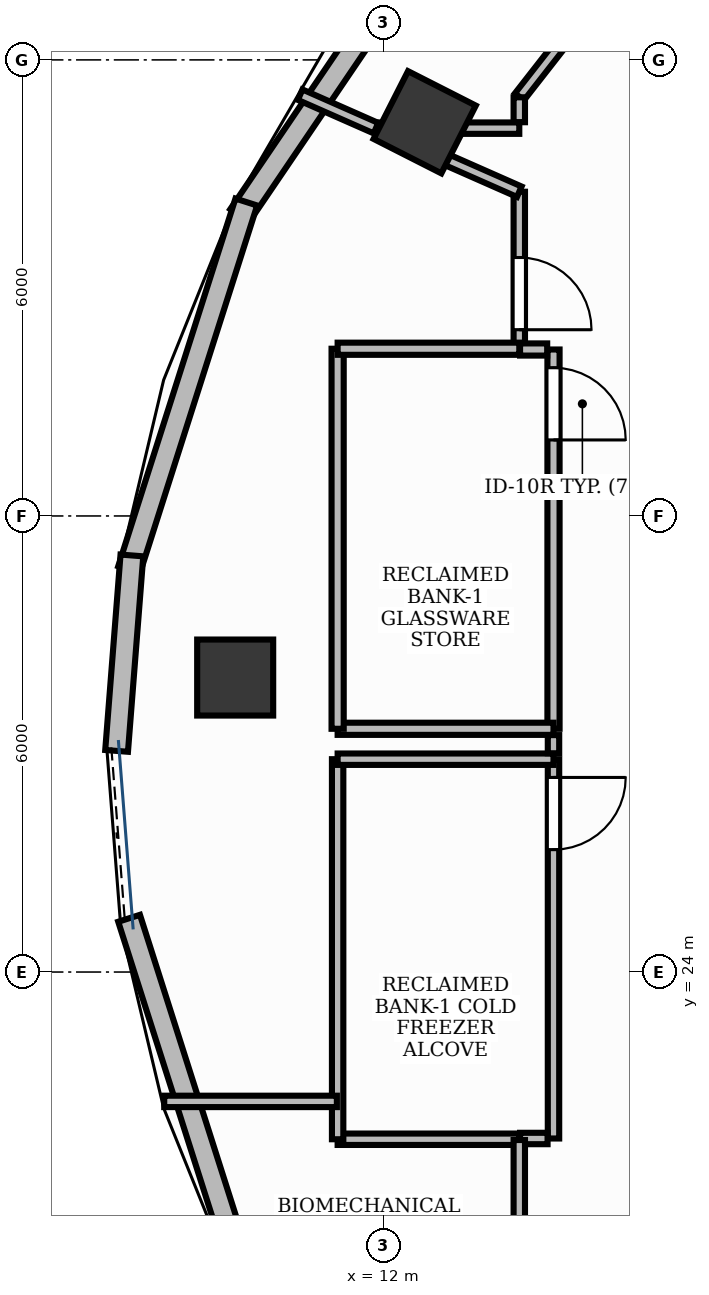
"""IFC4 building model, lengths in metres.
Left out: names, types, materials, properties, quantities, classifications, styles, units other than length and angle.
Written with IfcOpenShell. Run it as: python <this file> out.ifc"""

import sys

from ifc_helpers import new_model, si_unit, direction, frame, frame_2d, origin, origin_2d, place, context, subcontext, project, spatial, rectangle, extrude, element, fill, save


model = new_model("IFC4")
c1 = context("Model", 3, precision=1e-05, world=origin(), true_north=direction((0.0, 1.0)))
c2 = subcontext(c1, "Body", "Model", "MODEL_VIEW")
j1 = project(units=[si_unit("LENGTHUNIT", "METRE"), si_unit("PLANEANGLEUNIT", "RADIAN")], contexts=[c1])
p1 = place(None, origin())
s1 = spatial("IfcSite", under=j1, at=p1, CompositionType="ELEMENT")
p2 = place(p1, origin())
s2 = spatial("IfcBuilding", under=s1, at=p2, CompositionType="ELEMENT")
p3 = place(p2, frame((0.0, 0.0, 200.4)))
s3 = spatial("IfcBuildingStorey", under=s2, at=p3, CompositionType="ELEMENT", Elevation=200.4)
for number, where, z_axis, x_axis in (
    (1, (12.545, 35.18, -0.0), (0.0, 0.0, 1.0), (0.453, 0.891, 0.0)),
    (2, (10.052, 27.874, -0.0), (0.0, 0.0, 1.0), (0.0, 1.0, 0.0)),
):
    element("IfcColumn", number, at=place(p3, frame(where, z_axis=z_axis, x_axis=x_axis)), inside=s3, PredefinedType="COLUMN", context=c2, shape_type="SweptSolid", body=[
        extrude(rectangle(XDim=1.0, YDim=1.0, at=origin_2d()), origin(), (0.0, 0.0, 1.0), 3.901),
    ])
p4 = place(p3, frame((13.103, 38.36, 0.0), z_axis=(0.0, 0.0, 1.0), x_axis=(-0.561387104339, -0.827553333074, 0.0)))
e3 = element("IfcWall", 3, at=p4, inside=s3, PredefinedType="STANDARD", context=c2, shape_type="SweptSolid", body=[
    extrude(rectangle(XDim=5.327, YDim=0.3, at=frame_2d((2.664, 0.0))), origin(), (0.0, 0.0, 1.0), 3.47),
])
p5 = place(p3, frame((10.198, 34.13, 0.0), z_axis=(0.0, 0.0, 1.0), x_axis=(-0.30372166002, -0.952760805887, 0.0)))
e4 = element("IfcWall", 4, at=p5, inside=s3, PredefinedType="STANDARD", context=c2, shape_type="SweptSolid", body=[
    extrude(rectangle(XDim=5.077, YDim=0.3, at=frame_2d((2.539, 0.0))), origin(), (0.0, 0.0, 1.0), 3.47),
])
p6 = place(p3, frame((8.693, 29.48, 0.0), z_axis=(0.0, 0.0, 1.0), x_axis=(-0.077999392987, -0.996953406481, 0.0)))
e5 = element("IfcWall", 5, at=p6, inside=s3, PredefinedType="STANDARD", context=c2, shape_type="SweptSolid", body=[
    extrude(rectangle(XDim=2.579, YDim=0.3, at=frame_2d((1.29, 0.0))), origin(), (0.0, 0.0, 1.0), 3.47),
])
p7 = place(p3, frame((8.656, 24.707, 0.0), z_axis=(0.0, 0.0, 1.0), x_axis=(0.30372166002, -0.952760805887, 0.0)))
e6 = element("IfcWall", 6, at=p7, inside=s3, PredefinedType="STANDARD", context=c2, shape_type="SweptSolid", body=[
    extrude(rectangle(XDim=5.077, YDim=0.3, at=frame_2d((2.539, 0.0))), origin(), (0.0, 0.0, 1.0), 3.9),
])
p8 = place(p3, frame((14.24, 26.8, 0.0), z_axis=(0.0, 0.0, 1.0), x_axis=(0.0, -1.0, 0.0)))
e7 = element("IfcWall", 7, at=p8, inside=s3, PredefinedType="PARTITIONING", context=c2, shape_type="SweptSolid", body=[
    extrude(rectangle(XDim=4.99, YDim=0.15, at=frame_2d((2.495, 0.0))), origin(), (0.0, 0.0, 1.0), 2.91),
])
p9 = place(p8, frame((0.24, 0.0, 0.0)))
e8 = element("IfcOpeningElement", 8, at=p9, cuts=e7, PredefinedType="OPENING", context=c2, shape_type="SweptSolid", body=[
    extrude(rectangle(XDim=0.95, YDim=2.15, at=frame_2d((0.475, 1.075))), frame((0.0, 0.09, 0.0), z_axis=(0.0, -1.0, 0.0), x_axis=(1.0, 0.0, 0.0)), (0.0, 0.0, 1.0), 0.18),
])
p10 = place(p3, frame((14.24, 32.19, 0.0), z_axis=(0.0, 0.0, 1.0), x_axis=(0.0, -1.0, 0.0)))
e9 = element("IfcWall", 9, at=p10, inside=s3, PredefinedType="PARTITIONING", context=c2, shape_type="SweptSolid", body=[
    extrude(rectangle(XDim=4.99, YDim=0.16, at=frame_2d((2.495, 0.0))), origin(), (0.0, 0.0, 1.0), 2.91),
])
p11 = place(p10, frame((0.24, 0.0, 0.0)))
e10 = element("IfcOpeningElement", 10, at=p11, cuts=e9, PredefinedType="OPENING", context=c2, shape_type="SweptSolid", body=[
    extrude(rectangle(XDim=0.95, YDim=2.15, at=frame_2d((0.475, 1.075))), frame((0.0, 0.095, 0.0), z_axis=(0.0, -1.0, 0.0), x_axis=(1.0, 0.0, 0.0)), (0.0, 0.0, 1.0), 0.19),
])
p12 = place(p3, frame((13.79, 34.266, 0.0), z_axis=(0.0, 0.0, 1.0), x_axis=(0.0, -1.0, 0.0)))
e11 = element("IfcWall", 11, at=p12, inside=s3, PredefinedType="PARTITIONING", context=c2, shape_type="SweptSolid", body=[
    extrude(rectangle(XDim=2.056, YDim=0.15, at=frame_2d((1.028, 0.0))), origin(), (0.0, 0.0, 1.0), 2.91),
])
p13 = place(p12, frame((0.865, 0.0, 0.0)))
e12 = element("IfcOpeningElement", 12, at=p13, cuts=e11, PredefinedType="OPENING", context=c2, shape_type="SweptSolid", body=[
    extrude(rectangle(XDim=0.95, YDim=2.15, at=frame_2d((0.475, 1.075))), frame((0.0, 0.09, 0.0), z_axis=(0.0, -1.0, 0.0), x_axis=(1.0, 0.0, 0.0)), (0.0, 0.0, 1.0), 0.18),
])
p14 = place(p3, frame((14.162, 21.81, 0.0), z_axis=(0.0, 0.0, 1.0), x_axis=(-1.0, 0.0, 0.0)))
e13 = element("IfcWall", 13, at=p14, inside=s3, PredefinedType="PARTITIONING", context=c2, shape_type="SweptSolid", body=[
    extrude(rectangle(XDim=0.362, YDim=0.15, at=frame_2d((0.181, 0.0))), origin(), (0.0, 0.0, 1.0), 2.91),
])
p15 = place(p3, frame((13.79, 21.8, 0.0), z_axis=(0.0, 0.0, 1.0), x_axis=(-1.0, 0.0, 0.0)))
e14 = element("IfcWall", 14, at=p15, inside=s3, PredefinedType="PARTITIONING", context=c2, shape_type="SweptSolid", body=[
    extrude(rectangle(XDim=2.39, YDim=0.15, at=frame_2d((1.195, 0.0))), origin(), (0.0, 0.0, 1.0), 2.91),
])
p16 = place(p3, frame((11.4, 21.8, 0.0), z_axis=(0.0, 0.0, 1.0), x_axis=(0.0, 1.0, 0.0)))
e15 = element("IfcWall", 15, at=p16, inside=s3, PredefinedType="PARTITIONING", context=c2, shape_type="SweptSolid", body=[
    extrude(rectangle(XDim=5.0, YDim=0.15, at=frame_2d((2.5, 0.0))), origin(), (0.0, 0.0, 1.0), 2.91),
])
p17 = place(p3, frame((11.4, 26.8, 0.0), z_axis=(0.0, 0.0, 1.0), x_axis=(1.0, 0.0, 0.0)))
e16 = element("IfcWall", 16, at=p17, inside=s3, PredefinedType="PARTITIONING", context=c2, shape_type="SweptSolid", body=[
    extrude(rectangle(XDim=2.84, YDim=0.15, at=frame_2d((1.42, 0.0))), origin(), (0.0, 0.0, 1.0), 2.91),
])
p18 = place(p3, frame((13.8, 32.19, 0.0), z_axis=(0.0, 0.0, 1.0), x_axis=(1.0, 0.0, 0.0)))
e17 = element("IfcWall", 17, at=p18, inside=s3, PredefinedType="PARTITIONING", context=c2, shape_type="SweptSolid", body=[
    extrude(rectangle(XDim=0.357, YDim=0.16, at=frame_2d((0.178, 0.0))), origin(), (0.0, 0.0, 1.0), 2.91),
])
p19 = place(p3, frame((14.24, 27.2, 0.0), z_axis=(0.0, 0.0, 1.0), x_axis=(-1.0, 0.0, 0.0)))
e18 = element("IfcWall", 18, at=p19, inside=s3, PredefinedType="PARTITIONING", context=c2, shape_type="SweptSolid", body=[
    extrude(rectangle(XDim=2.84, YDim=0.16, at=frame_2d((1.42, 0.0))), origin(), (0.0, 0.0, 1.0), 2.91),
])
p20 = place(p3, frame((11.4, 27.2, 0.0), z_axis=(0.0, 0.0, 1.0), x_axis=(0.0, 1.0, 0.0)))
e19 = element("IfcWall", 19, at=p20, inside=s3, PredefinedType="PARTITIONING", context=c2, shape_type="SweptSolid", body=[
    extrude(rectangle(XDim=5.0, YDim=0.16, at=frame_2d((2.5, 0.0))), origin(), (0.0, 0.0, 1.0), 2.91),
])
p21 = place(p3, frame((11.4, 32.2, 0.0), z_axis=(0.0, 0.0, 1.0), x_axis=(1.0, 0.0, 0.0)))
e20 = element("IfcWall", 20, at=p21, inside=s3, PredefinedType="PARTITIONING", context=c2, shape_type="SweptSolid", body=[
    extrude(rectangle(XDim=2.39, YDim=0.16, at=frame_2d((1.195, 0.0))), origin(), (0.0, 0.0, 1.0), 2.91),
])
p22 = place(p3, frame((9.119, 22.298, 0.0), z_axis=(0.0, 0.0, 1.0), x_axis=(1.0, 0.0, 0.0)))
e21 = element("IfcWall", 21, at=p22, inside=s3, PredefinedType="PARTITIONING", context=c2, shape_type="SweptSolid", body=[
    extrude(rectangle(XDim=2.271, YDim=0.15, at=frame_2d((1.136, 0.0))), origin(), (0.0, 0.0, 1.0), 2.91),
])
p23 = place(p3, frame((13.79, 21.79, 0.0), z_axis=(0.0, 0.0, 1.0), x_axis=(0.0, -1.0, 0.0)))
e22 = element("IfcWall", 22, at=p23, inside=s3, PredefinedType="PARTITIONING", context=c2, shape_type="SweptSolid", body=[
    extrude(rectangle(XDim=3.298, YDim=0.15, at=frame_2d((1.649, 0.0))), origin(), (0.0, 0.0, 1.0), 2.91),
])
p24 = place(p3, frame((14.76, 36.754, 0.0), z_axis=(0.0, 0.0, 1.0), x_axis=(-0.615625972761, -0.788038489962, 0.0)))
e23 = element("IfcWall", 23, at=p24, inside=s3, PredefinedType="PARTITIONING", context=c2, shape_type="SweptSolid", body=[
    extrude(rectangle(XDim=1.573, YDim=0.15, at=frame_2d((0.787, 0.0))), origin(), (0.0, 0.0, 1.0), 2.91),
])
p25 = place(p3, frame((13.79, 35.508, 0.0), z_axis=(0.0, 0.0, 1.0), x_axis=(0.0, -1.0, 0.0)))
e24 = element("IfcWall", 24, at=p25, inside=s3, PredefinedType="PARTITIONING", context=c2, shape_type="SweptSolid", body=[
    extrude(rectangle(XDim=0.328, YDim=0.15, at=frame_2d((0.164, 0.0))), origin(), (0.0, 0.0, 1.0), 2.91),
])
p26 = place(p3, frame((13.79, 35.102, 0.0), z_axis=(0.0, 0.0, 1.0), x_axis=(-1.0, 0.0, 0.0)))
e25 = element("IfcWall", 25, at=p26, inside=s3, PredefinedType="PARTITIONING", context=c2, shape_type="SweptSolid", body=[
    extrude(rectangle(XDim=1.885, YDim=0.15, at=frame_2d((0.943, 0.0))), origin(), (0.0, 0.0, 1.0), 2.91),
])
p27 = place(p3, frame((11.904, 35.102, 0.0), z_axis=(0.0, 0.0, 1.0), x_axis=(-0.914934829938, 0.403601606744, 0.0)))
e26 = element("IfcWall", 26, at=p27, inside=s3, PredefinedType="PARTITIONING", context=c2, shape_type="SweptSolid", body=[
    extrude(rectangle(XDim=1.09, YDim=0.15, at=frame_2d((0.545, 0.0))), origin(), (0.0, 0.0, 1.0), 2.91),
])
p28 = place(p3, frame((12.438, 34.862, 0.0), z_axis=(0.0, 0.0, 1.0), x_axis=(0.91487830716, -0.403729715389, 0.0)))
e27 = element("IfcWall", 27, at=p28, inside=s3, PredefinedType="PARTITIONING", context=c2, shape_type="SweptSolid", body=[
    extrude(rectangle(XDim=1.477, YDim=0.15, at=frame_2d((0.739, 0.0))), origin(), (0.0, 0.0, 1.0), 2.91),
])
p29 = place(p3, frame((14.24, 27.117, 0.0), z_axis=(0.0, 0.0, 1.0), x_axis=(0.0, -1.0, 0.0)))
e28 = element("IfcWall", 28, at=p29, inside=s3, PredefinedType="PARTITIONING", context=c2, shape_type="SweptSolid", body=[
    extrude(rectangle(XDim=0.239, YDim=0.15, at=frame_2d((0.12, 0.0))), origin(), (0.0, 0.0, 1.0), 2.91),
])
p30 = place(p9, origin())
e29 = element("IfcDoor", 29, at=p30, inside=s3, OperationType="SINGLE_SWING_LEFT", PredefinedType="DOOR", context=c2, shape_type="SweptSolid", body=[
    extrude(rectangle(XDim=0.95, YDim=2.15, at=frame_2d((0.475, 1.075))), frame((0.0, 0.025, 0.0), z_axis=(0.0, -1.0, 0.0), x_axis=(1.0, 0.0, 0.0)), (0.0, 0.0, 1.0), 0.05),
])
fill(e8, e29)
p31 = place(p11, origin())
e30 = element("IfcDoor", 30, at=p31, inside=s3, OperationType="SINGLE_SWING_RIGHT", PredefinedType="DOOR", context=c2, shape_type="SweptSolid", body=[
    extrude(rectangle(XDim=0.95, YDim=2.15, at=frame_2d((0.475, 1.075))), frame((0.0, 0.025, 0.0), z_axis=(0.0, -1.0, 0.0), x_axis=(1.0, 0.0, 0.0)), (0.0, 0.0, 1.0), 0.05),
])
fill(e10, e30)
p32 = place(p13, origin())
e31 = element("IfcDoor", 31, at=p32, inside=s3, OperationType="SINGLE_SWING_RIGHT", PredefinedType="DOOR", context=c2, shape_type="SweptSolid", body=[
    extrude(rectangle(XDim=0.95, YDim=2.15, at=frame_2d((0.475, 1.075))), frame((0.0, 0.025, 0.0), z_axis=(0.0, -1.0, 0.0), x_axis=(1.0, 0.0, 0.0)), (0.0, 0.0, 1.0), 0.05),
])
fill(e12, e31)
save(model, sys.argv[1])
